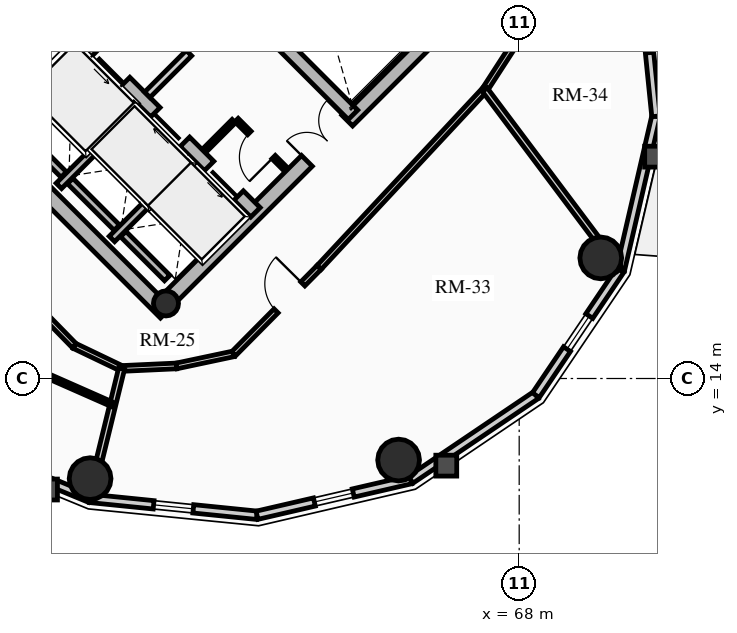
"""IFC4 building model, lengths in metres.
Left out: names, types, materials, properties, quantities, classifications, styles, units other than length and angle.
Written with IfcOpenShell. Run it as: python <this file> out.ifc"""

import sys

from ifc_helpers import new_model, si_unit, direction, frame, frame_2d, origin, origin_2d, place, context, subcontext, project, spatial, rectangle, circle, hollow_circle, extrude, source, transform, mapped, element, fill, save


model = new_model("IFC4")
c1 = context("Model", 3, precision=1e-05, world=origin(), true_north=direction((0.0, 1.0)))
c2 = subcontext(c1, "Body", "Model", "MODEL_VIEW")
j1 = project(units=[si_unit("LENGTHUNIT", "METRE"), si_unit("PLANEANGLEUNIT", "RADIAN")], contexts=[c1])
p1 = place(None, origin())
s1 = spatial("IfcSite", under=j1, at=p1, CompositionType="ELEMENT")
p2 = place(p1, origin())
s2 = spatial("IfcBuilding", under=s1, at=p2, CompositionType="ELEMENT")
p3 = place(p2, frame((0.0, 0.0, 217.03)))
s3 = spatial("IfcBuildingStorey", under=s2, at=p3, CompositionType="ELEMENT", Elevation=217.03)
p4 = place(p3, frame((58.702, 15.732, 0.0), z_axis=(0.0, 0.0, 1.0), x_axis=(-0.707106781187, 0.707106781187, 0.0)))
e1 = element("IfcWall", 1, at=p4, inside=s3, PredefinedType="SHEAR", context=c2, shape_type="SweptSolid", body=[
    extrude(rectangle(XDim=14.1, YDim=0.4, at=frame_2d((7.05, 0.0))), origin(), (0.0, 0.0, 1.0), 2.91),
])
p5 = place(p3, frame((58.561, 15.873, 0.0), z_axis=(0.0, 0.0, 1.0), x_axis=(0.707106781187, 0.707106781187, 0.0)))
e2 = element("IfcWall", 2, at=p5, inside=s3, PredefinedType="SHEAR", context=c2, shape_type="SweptSolid", body=[
    extrude(rectangle(XDim=10.7, YDim=0.4, at=frame_2d((5.35, 0.0))), origin(), (0.0, 0.0, 1.0), 2.91),
])
m1 = source(origin(), c2, "Body", "SweptSolid", [
    extrude(rectangle(XDim=1.5, YDim=2.02, at=frame_2d((0.75, 1.01))), frame((0.0, 0.21, 0.0), z_axis=(0.0, -1.0, 0.0), x_axis=(1.0, 0.0, 0.0)), (0.0, 0.0, 1.0), 0.42),
])
p6 = place(p5, frame((5.45, 0.0, 0.0)))
e3 = element("IfcOpeningElement", 3, at=p6, cuts=e2, PredefinedType="OPENING", context=c2, shape_type="MappedRepresentation", body=[
    mapped(m1, transform((0.0, 0.0, 0.0), x_axis=(1.0, 0.0, 0.0), y_axis=(0.0, 1.0, 0.0), z_axis=(0.0, 0.0, 1.0), scale=1.0)),
])
p7 = place(p3, frame((61.06, 18.373, 0.0), z_axis=(0.0, 0.0, 1.0), x_axis=(-0.707106781187, 0.707106781187, 0.0)))
e4 = element("IfcWall", 4, at=p7, inside=s3, PredefinedType="SHEAR", context=c2, shape_type="SweptSolid", body=[
    extrude(rectangle(XDim=13.7, YDim=0.35, at=frame_2d((6.85, 0.0))), origin(), (0.0, 0.0, 1.0), 2.91),
])
m2 = source(origin(), c2, "Body", "SweptSolid", [
    extrude(rectangle(XDim=1.1, YDim=2.015, at=frame_2d((0.55, 1.007))), frame((0.0, 0.185, 0.0), z_axis=(0.0, -1.0, 0.0), x_axis=(1.0, 0.0, 0.0)), (0.0, 0.0, 1.0), 0.37),
])
p8 = place(p7, frame((4.85, 0.0, 0.0)))
e5 = element("IfcOpeningElement", 5, at=p8, cuts=e4, PredefinedType="OPENING", context=c2, shape_type="MappedRepresentation", body=[
    mapped(m2, transform((0.0, 0.0, 0.0), x_axis=(1.0, 0.0, 0.0), y_axis=(0.0, 1.0, 0.0), z_axis=(0.0, 0.0, 1.0), scale=1.0)),
])
p9 = place(p7, frame((0.625, 0.0, 0.0)))
e6 = element("IfcOpeningElement", 6, at=p9, cuts=e4, PredefinedType="OPENING", context=c2, shape_type="MappedRepresentation", body=[
    mapped(m2, transform((0.0, 0.0, 0.0), x_axis=(1.0, 0.0, 0.0), y_axis=(0.0, 1.0, 0.0), z_axis=(0.0, 0.0, 1.0), scale=1.0)),
])
p10 = place(p7, frame((2.625, 0.0, 0.0)))
e7 = element("IfcOpeningElement", 7, at=p10, cuts=e4, PredefinedType="OPENING", context=c2, shape_type="MappedRepresentation", body=[
    mapped(m2, transform((0.0, 0.0, 0.0), x_axis=(1.0, 0.0, 0.0), y_axis=(0.0, 1.0, 0.0), z_axis=(0.0, 0.0, 1.0), scale=1.0)),
])
m3 = source(origin(), c2, "Body", "SweptSolid", [
    extrude(rectangle(XDim=1.15, YDim=2.02, at=frame_2d((0.575, 1.01))), frame((0.0, 0.185, 0.0), z_axis=(0.0, -1.0, 0.0), x_axis=(1.0, 0.0, 0.0)), (0.0, 0.0, 1.0), 0.37),
])
p11 = place(p7, frame((7.27, 0.0, 0.0)))
e8 = element("IfcOpeningElement", 8, at=p11, cuts=e4, PredefinedType="OPENING", context=c2, shape_type="MappedRepresentation", body=[
    mapped(m3, transform((0.0, 0.0, 0.0), x_axis=(1.0, 0.0, 0.0), y_axis=(0.0, 1.0, 0.0), z_axis=(0.0, 0.0, 1.0), scale=1.0)),
])
p12 = place(p3, frame((63.627, 20.94, 0.0), z_axis=(0.0, 0.0, 1.0), x_axis=(-0.707119496762, 0.707094065383, 0.0)))
e9 = element("IfcWall", 9, at=p12, inside=s3, PredefinedType="SHEAR", context=c2, shape_type="SweptSolid", body=[
    extrude(rectangle(XDim=9.6, YDim=0.35, at=frame_2d((4.8, 0.0))), origin(), (0.0, 0.0, 1.0), 2.91),
])
p13 = place(p12, frame((5.28, 0.0, 0.0)))
e10 = element("IfcOpeningElement", 10, at=p13, cuts=e9, PredefinedType="OPENING", context=c2, shape_type="MappedRepresentation", body=[
    mapped(m3, transform((0.0, 0.0, 0.0), x_axis=(1.0, 0.0, 0.0), y_axis=(0.0, 1.0, 0.0), z_axis=(0.0, 0.0, 1.0), scale=1.0)),
])
p14 = place(p3, frame((53.784, 21.003, 0.0), z_axis=(0.0, 0.0, 1.0), x_axis=(0.707106781187, 0.707106781187, 0.0)))
e11 = element("IfcWall", 11, at=p14, inside=s3, PredefinedType="SHEAR", context=c2, shape_type="SweptSolid", body=[
    extrude(rectangle(XDim=3.285, YDim=0.35, at=frame_2d((1.643, 0.0))), origin(), (0.0, 0.0, 1.0), 2.91),
])
p15 = place(p3, frame((58.706, 15.976, 0.0), z_axis=(0.0, 0.0, 1.0), x_axis=(0.707106781187, 0.707106781187, 0.0)))
e12 = element("IfcColumn", 12, at=p15, inside=s3, PredefinedType="COLUMN", context=c2, shape_type="SweptSolid", body=[
    extrude(hollow_circle(Radius=0.33, WallThickness=0.025, at=origin_2d()), origin(), (0.0, 0.0, 1.0), 2.91),
])
for number, where, z_axis, x_axis in (
    (13, (56.709, 11.365, 0.0), (0.0, 0.0, 1.0), (1.0, 0.0, 0.0)),
    (14, (64.827, 11.854, 0.0), (0.0, 0.0, 1.0), (1.0, 0.0, 0.0)),
    (15, (70.146, 17.173, 0.0), (0.0, 0.0, 1.0), (1.0, 0.0, 0.0)),
):
    element("IfcColumn", number, at=place(p3, frame(where, z_axis=z_axis, x_axis=x_axis)), inside=s3, PredefinedType="USERDEFINED", context=c2, shape_type="SweptSolid", body=[
        extrude(circle(Radius=0.55, at=origin_2d()), origin(), (0.0, 0.0, 1.0), 2.91),
    ])
p16 = place(p3, frame((56.705, 10.845, 0.0), z_axis=(0.0, 0.0, 1.0), x_axis=(-0.924447353237, 0.381309704956, 0.0)))
e16 = element("IfcWall", 16, at=p16, inside=s3, PredefinedType="SOLIDWALL", context=c2, shape_type="SweptSolid", body=[
    extrude(rectangle(XDim=4.671, YDim=0.22, at=frame_2d((2.335, 0.0))), origin(), (0.0, 0.0, 1.0), 2.322),
])
p17 = place(p3, frame((61.1, 10.401, 0.0), z_axis=(0.0, 0.0, 1.0), x_axis=(-0.994929930991, 0.100570534541, 0.0)))
e17 = element("IfcWall", 17, at=p17, inside=s3, PredefinedType="SOLIDWALL", context=c2, shape_type="SweptSolid", body=[
    extrude(rectangle(XDim=4.418, YDim=0.22, at=frame_2d((2.209, 0.0))), origin(), (0.0, 0.0, 1.0), 2.322),
])
m4 = source(origin(), c2, "Body", "SweptSolid", [
    extrude(rectangle(XDim=1.05, YDim=1.3, at=frame_2d((0.525, 0.65))), frame((0.0, 0.12, 0.0), z_axis=(0.0, -1.0, 0.0), x_axis=(1.0, 0.0, 0.0)), (0.0, 0.0, 1.0), 0.24),
])
p18 = place(p17, frame((1.684, 0.0, 0.65)))
e18 = element("IfcOpeningElement", 18, at=p18, cuts=e17, PredefinedType="OPENING", context=c2, shape_type="MappedRepresentation", body=[
    mapped(m4, transform((0.0, 0.0, 0.0), x_axis=(1.0, 0.0, 0.0), y_axis=(0.0, 1.0, 0.0), z_axis=(0.0, 0.0, 1.0), scale=1.0)),
])
p19 = place(p3, frame((65.144, 11.337, 0.0), z_axis=(0.0, 0.0, 1.0), x_axis=(-0.974249228678, -0.225473813158, 0.0)))
e19 = element("IfcWall", 19, at=p19, inside=s3, PredefinedType="SOLIDWALL", context=c2, shape_type="SweptSolid", body=[
    extrude(rectangle(XDim=4.15, YDim=0.22, at=frame_2d((2.075, 0.0))), origin(), (0.0, 0.0, 1.0), 2.322),
])
p20 = place(p19, frame((1.55, 0.0, 0.65)))
e20 = element("IfcOpeningElement", 20, at=p20, cuts=e19, PredefinedType="OPENING", context=c2, shape_type="MappedRepresentation", body=[
    mapped(m4, transform((0.0, 0.0, 0.0), x_axis=(1.0, 0.0, 0.0), y_axis=(0.0, 1.0, 0.0), z_axis=(0.0, 0.0, 1.0), scale=1.0)),
])
p21 = place(p3, frame((68.439, 13.561, 0.0), z_axis=(0.0, 0.0, 1.0), x_axis=(-0.828833723692, -0.559495003079, 0.0)))
e21 = element("IfcWall", 21, at=p21, inside=s3, PredefinedType="SOLIDWALL", context=c2, shape_type="SweptSolid", body=[
    extrude(rectangle(XDim=3.976, YDim=0.22, at=frame_2d((1.988, 0.0))), origin(), (0.0, 0.0, 1.0), 2.322),
])
p22 = place(p3, frame((70.663, 16.856, 0.0), z_axis=(0.0, 0.0, 1.0), x_axis=(-0.559495003079, -0.828833723692, 0.0)))
e22 = element("IfcWall", 22, at=p22, inside=s3, PredefinedType="SOLIDWALL", context=c2, shape_type="SweptSolid", body=[
    extrude(rectangle(XDim=3.976, YDim=0.22, at=frame_2d((1.988, 0.0))), origin(), (0.0, 0.0, 1.0), 2.322),
])
p23 = place(p22, frame((1.463, 0.0, 0.65)))
e23 = element("IfcOpeningElement", 23, at=p23, cuts=e22, PredefinedType="OPENING", context=c2, shape_type="MappedRepresentation", body=[
    mapped(m4, transform((0.0, 0.0, 0.0), x_axis=(1.0, 0.0, 0.0), y_axis=(0.0, 1.0, 0.0), z_axis=(0.0, 0.0, 1.0), scale=1.0)),
])
p24 = place(p3, frame((71.599, 20.9, 0.0), z_axis=(0.0, 0.0, 1.0), x_axis=(-0.225473813158, -0.974249228678, 0.0)))
e24 = element("IfcWall", 24, at=p24, inside=s3, PredefinedType="SOLIDWALL", context=c2, shape_type="SweptSolid", body=[
    extrude(rectangle(XDim=4.15, YDim=0.22, at=frame_2d((2.075, 0.0))), origin(), (0.0, 0.0, 1.0), 2.322),
])
p25 = place(p3, frame((71.155, 25.295, 0.0), z_axis=(0.0, 0.0, 1.0), x_axis=(0.100570534541, -0.994929930991, 0.0)))
e25 = element("IfcWall", 25, at=p25, inside=s3, PredefinedType="SOLIDWALL", context=c2, shape_type="SweptSolid", body=[
    extrude(rectangle(XDim=4.418, YDim=0.22, at=frame_2d((2.209, 0.0))), origin(), (0.0, 0.0, 1.0), 2.322),
])
p26 = place(p25, frame((1.684, 0.0, 0.65)))
e26 = element("IfcOpeningElement", 26, at=p26, cuts=e25, PredefinedType="OPENING", context=c2, shape_type="MappedRepresentation", body=[
    mapped(m4, transform((0.0, 0.0, 0.0), x_axis=(1.0, 0.0, 0.0), y_axis=(0.0, 1.0, 0.0), z_axis=(0.0, 0.0, 1.0), scale=1.0)),
])
p27 = place(p3, frame((55.888, 19.069, 0.0), z_axis=(0.0, 0.0, 1.0), x_axis=(0.707106781187, 0.707106781187, 0.0)))
e27 = element("IfcWall", 27, at=p27, inside=s3, PredefinedType="SHEAR", context=c2, shape_type="SweptSolid", body=[
    extrude(rectangle(XDim=2.97, YDim=0.2, at=frame_2d((1.485, 0.0))), origin(), (0.0, 0.0, 1.0), 2.91),
])
p28 = place(p3, frame((56.015, 19.366, 0.0), z_axis=(0.0, 0.0, 1.0), x_axis=(-0.707106781187, 0.707106781187, 0.0)))
e28 = element("IfcWall", 28, at=p28, inside=s3, PredefinedType="SHEAR", context=c2, shape_type="SweptSolid", body=[
    extrude(rectangle(XDim=2.44, YDim=0.2, at=frame_2d((1.22, 0.0))), origin(), (0.0, 0.0, 1.0), 2.91),
])
p29 = place(p3, frame((57.284, 17.673, 0.0), z_axis=(0.0, 0.0, 1.0), x_axis=(0.707147878904, 0.70706568108, 0.0)))
e29 = element("IfcWall", 29, at=p29, inside=s3, PredefinedType="SHEAR", context=c2, shape_type="SweptSolid", body=[
    extrude(rectangle(XDim=2.97, YDim=0.2, at=frame_2d((1.485, 0.0))), origin(), (0.0, 0.0, 1.0), 2.91),
])
p30 = place(p3, frame((57.412, 17.97, 0.0), z_axis=(0.0, 0.0, 1.0), x_axis=(-0.707106781187, 0.707106781187, 0.0)))
e30 = element("IfcWall", 30, at=p30, inside=s3, PredefinedType="SHEAR", context=c2, shape_type="SweptSolid", body=[
    extrude(rectangle(XDim=1.735, YDim=0.2, at=frame_2d((0.867, 0.0))), origin(), (0.0, 0.0, 1.0), 2.91),
])
p31 = place(p3, frame((58.737, 16.644, 0.0), z_axis=(0.0, 0.0, 1.0), x_axis=(-0.707032117043, 0.707181437447, 0.0)))
e31 = element("IfcWall", 31, at=p31, inside=s3, PredefinedType="SHEAR", context=c2, shape_type="SweptSolid", body=[
    extrude(rectangle(XDim=1.635, YDim=0.2, at=frame_2d((0.817, 0.0))), origin(), (0.0, 0.0, 1.0), 2.91),
])
p32 = place(p3, frame((58.214, 21.467, 0.0), z_axis=(0.0, 0.0, 1.0), x_axis=(0.707106781187, 0.707106781187, 0.0)))
e32 = element("IfcWall", 32, at=p32, inside=s3, PredefinedType="PARTITIONING", context=c2, shape_type="SweptSolid", body=[
    extrude(rectangle(XDim=3.28, YDim=0.2, at=frame_2d((1.64, 0.0))), origin(), (0.0, 0.0, 1.0), 2.685),
])
m5 = source(origin(), c2, "Body", "SweptSolid", [
    extrude(rectangle(XDim=1.5, YDim=2.02, at=frame_2d((0.75, 1.01))), frame((0.0, 0.11, 0.0), z_axis=(0.0, -1.0, 0.0), x_axis=(1.0, 0.0, 0.0)), (0.0, 0.0, 1.0), 0.22),
])
p33 = place(p32, frame((1.55, 0.0, 0.0)))
e33 = element("IfcOpeningElement", 33, at=p33, cuts=e32, PredefinedType="OPENING", context=c2, shape_type="MappedRepresentation", body=[
    mapped(m5, transform((0.0, 0.0, 0.0), x_axis=(1.0, 0.0, 0.0), y_axis=(0.0, 1.0, 0.0), z_axis=(0.0, 0.0, 1.0), scale=1.0)),
])
p34 = place(p3, frame((61.835, 19.529, 0.0), z_axis=(0.0, 0.0, 1.0), x_axis=(-0.707174592913, 0.707038962956, 0.0)))
e34 = element("IfcWall", 34, at=p34, inside=s3, PredefinedType="PARTITIONING", context=c2, shape_type="SweptSolid", body=[
    extrude(rectangle(XDim=1.8, YDim=0.125, at=frame_2d((0.9, 0.0))), origin(), (0.0, 0.0, 1.0), 2.685),
])
m6 = source(origin(), c2, "Body", "SweptSolid", [
    extrude(rectangle(XDim=0.9, YDim=2.005, at=frame_2d((0.45, 1.002))), frame((0.0, 0.073, 0.0), z_axis=(0.0, -1.0, 0.0), x_axis=(1.0, 0.0, 0.0)), (0.0, 0.0, 1.0), 0.145),
])
p35 = place(p34, frame((0.42, 0.0, 0.0)))
e35 = element("IfcOpeningElement", 35, at=p35, cuts=e34, PredefinedType="OPENING", context=c2, shape_type="MappedRepresentation", body=[
    mapped(m6, transform((0.0, 0.0, 0.0), x_axis=(1.0, 0.0, 0.0), y_axis=(0.0, 1.0, 0.0), z_axis=(0.0, 0.0, 1.0), scale=1.0)),
])
p36 = place(p3, frame((59.713, 19.996, 0.0), z_axis=(0.0, 0.0, 1.0), x_axis=(0.707217726, 0.706995818963, 0.0)))
e36 = element("IfcWall", 36, at=p36, inside=s3, PredefinedType="PARTITIONING", context=c2, shape_type="SweptSolid", body=[
    extrude(rectangle(XDim=1.1, YDim=0.125, at=frame_2d((0.55, 0.0))), origin(), (0.0, 0.0, 1.0), 2.685),
])
p37 = place(p3, frame((52.126, 19.126, 0.0), z_axis=(0.0, 0.0, 1.0), x_axis=(0.698979087027, -0.715142108884, 0.0)))
e37 = element("IfcWall", 37, at=p37, inside=s3, PredefinedType="PARTITIONING", context=c2, shape_type="SweptSolid", body=[
    extrude(rectangle(XDim=5.966, YDim=0.15, at=frame_2d((2.983, 0.0))), origin(), (0.0, 0.0, 1.0), 2.322),
])
m7 = source(origin(), c2, "Body", "SweptSolid", [
    extrude(rectangle(XDim=1.05, YDim=2.015, at=frame_2d((0.525, 1.007))), frame((0.0, 0.085, 0.0), z_axis=(0.0, -1.0, 0.0), x_axis=(1.0, 0.0, 0.0)), (0.0, 0.0, 1.0), 0.17),
])
p38 = place(p37, frame((2.458, 0.0, 0.0)))
e38 = element("IfcOpeningElement", 38, at=p38, cuts=e37, PredefinedType="OPENING", context=c2, shape_type="MappedRepresentation", body=[
    mapped(m7, transform((0.0, 0.0, 0.0), x_axis=(1.0, 0.0, 0.0), y_axis=(0.0, 1.0, 0.0), z_axis=(0.0, 0.0, 1.0), scale=1.0)),
])
p39 = place(p3, frame((56.296, 14.859, 0.0), z_axis=(0.0, 0.0, 1.0), x_axis=(0.90178292445, -0.432189260823, 0.0)))
e39 = element("IfcWall", 39, at=p39, inside=s3, PredefinedType="PARTITIONING", context=c2, shape_type="SweptSolid", body=[
    extrude(rectangle(XDim=1.377, YDim=0.15, at=frame_2d((0.688, 0.0))), origin(), (0.0, 0.0, 1.0), 2.255),
])
p40 = place(p3, frame((57.538, 14.264, 0.0), z_axis=(0.0, 0.0, 1.0), x_axis=(0.99892990172, 0.046249880546, 0.0)))
e40 = element("IfcWall", 40, at=p40, inside=s3, PredefinedType="PARTITIONING", context=c2, shape_type="SweptSolid", body=[
    extrude(rectangle(XDim=1.446, YDim=0.15, at=frame_2d((0.723, 0.0))), origin(), (0.0, 0.0, 1.0), 2.322),
])
p41 = place(p3, frame((58.983, 14.331, 0.0), z_axis=(0.0, 0.0, 1.0), x_axis=(0.978328007546, 0.207061125397, 0.0)))
e41 = element("IfcWall", 41, at=p41, inside=s3, PredefinedType="PARTITIONING", context=c2, shape_type="SweptSolid", body=[
    extrude(rectangle(XDim=1.534, YDim=0.15, at=frame_2d((0.767, 0.0))), origin(), (0.0, 0.0, 1.0), 2.255),
])
p42 = place(p3, frame((60.484, 14.648, 0.0), z_axis=(0.0, 0.0, 1.0), x_axis=(0.703398221944, 0.710795991383, 0.0)))
e42 = element("IfcWall", 42, at=p42, inside=s3, PredefinedType="PARTITIONING", context=c2, shape_type="SweptSolid", body=[
    extrude(rectangle(XDim=3.201, YDim=0.15, at=frame_2d((1.601, 0.0))), origin(), (0.0, 0.0, 1.0), 2.322),
])
m8 = source(origin(), c2, "Body", "SweptSolid", [
    extrude(rectangle(XDim=1.0, YDim=2.015, at=frame_2d((0.5, 1.007))), frame((0.0, 0.085, 0.0), z_axis=(0.0, -1.0, 0.0), x_axis=(1.0, 0.0, 0.0)), (0.0, 0.0, 1.0), 0.17),
])
p43 = place(p42, frame((1.591, 0.0, 0.0)))
e43 = element("IfcOpeningElement", 43, at=p43, cuts=e42, PredefinedType="OPENING", context=c2, shape_type="MappedRepresentation", body=[
    mapped(m8, transform((0.0, 0.0, 0.0), x_axis=(1.0, 0.0, 0.0), y_axis=(0.0, 1.0, 0.0), z_axis=(0.0, 0.0, 1.0), scale=1.0)),
])
p44 = place(p3, frame((62.736, 16.924, 0.0), z_axis=(0.0, 0.0, 1.0), x_axis=(0.681946700833, 0.731401871219, 0.0)))
e44 = element("IfcWall", 44, at=p44, inside=s3, PredefinedType="PARTITIONING", context=c2, shape_type="SweptSolid", body=[
    extrude(rectangle(XDim=6.393, YDim=0.15, at=frame_2d((3.196, 0.0))), origin(), (0.0, 0.0, 1.0), 2.255),
])
p45 = place(p3, frame((67.095, 21.6, 0.0), z_axis=(0.0, 0.0, 1.0), x_axis=(0.543773190184, 0.839232219137, 0.0)))
e45 = element("IfcWall", 45, at=p45, inside=s3, PredefinedType="PARTITIONING", context=c2, shape_type="SweptSolid", body=[
    extrude(rectangle(XDim=1.823, YDim=0.15, at=frame_2d((0.911, 0.0))), origin(), (0.0, 0.0, 1.0), 2.255),
])
p46 = place(p3, frame((57.538, 14.264, 0.0), z_axis=(0.0, 0.0, 1.0), x_axis=(-0.237377006249, -0.971417601706, 0.0)))
e46 = element("IfcWall", 46, at=p46, inside=s3, PredefinedType="PARTITIONING", context=c2, shape_type="SweptSolid", body=[
    extrude(rectangle(XDim=3.499, YDim=0.16, at=frame_2d((1.75, 0.0))), origin(), (0.0, 0.0, 1.0), 2.322),
])
p47 = place(p3, frame((67.095, 21.6, 0.0), z_axis=(0.0, 0.0, 1.0), x_axis=(0.599947190798, -0.800039604178, 0.0)))
e47 = element("IfcWall", 47, at=p47, inside=s3, PredefinedType="PARTITIONING", context=c2, shape_type="SweptSolid", body=[
    extrude(rectangle(XDim=5.918, YDim=0.16, at=frame_2d((2.959, 0.0))), origin(), (0.0, 0.0, 1.0), 2.322),
])
p48 = place(p3, frame((55.204, 14.239, 0.0), z_axis=(0.0, 0.0, 1.0), x_axis=(0.914999746908, -0.403454412738, 0.0)))
e48 = element("IfcWall", 48, at=p48, inside=s3, PredefinedType="PARTITIONING", context=c2, shape_type="SweptSolid", body=[
    extrude(rectangle(XDim=2.297, YDim=0.125, at=frame_2d((1.148, 0.0))), origin(), (0.0, 0.0, 1.0), 2.255),
])
m9 = source(origin(), c2, "Body", "SweptSolid", [
    extrude(rectangle(XDim=1.05, YDim=1.3, at=frame_2d((0.525, 0.65))), frame((0.0, 0.03, 0.0), z_axis=(0.0, -1.0, 0.0), x_axis=(1.0, 0.0, 0.0)), (0.0, 0.0, 1.0), 0.06),
])
p49 = place(p18, origin())
e49 = element("IfcWindow", 49, at=p49, inside=s3, PartitioningType="SINGLE_PANEL", PredefinedType="WINDOW", context=c2, shape_type="MappedRepresentation", body=[
    mapped(m9, transform((0.0, 0.0, 0.0), x_axis=(1.0, 0.0, 0.0), y_axis=(0.0, 1.0, 0.0), z_axis=(0.0, 0.0, 1.0), scale=1.0)),
])
fill(e18, e49)
p50 = place(p20, origin())
e50 = element("IfcWindow", 50, at=p50, inside=s3, PartitioningType="SINGLE_PANEL", PredefinedType="WINDOW", context=c2, shape_type="MappedRepresentation", body=[
    mapped(m9, transform((0.0, 0.0, 0.0), x_axis=(1.0, 0.0, 0.0), y_axis=(0.0, 1.0, 0.0), z_axis=(0.0, 0.0, 1.0), scale=1.0)),
])
fill(e20, e50)
p51 = place(p23, origin())
e51 = element("IfcWindow", 51, at=p51, inside=s3, PartitioningType="SINGLE_PANEL", PredefinedType="WINDOW", context=c2, shape_type="MappedRepresentation", body=[
    mapped(m9, transform((0.0, 0.0, 0.0), x_axis=(1.0, 0.0, 0.0), y_axis=(0.0, 1.0, 0.0), z_axis=(0.0, 0.0, 1.0), scale=1.0)),
])
fill(e23, e51)
p52 = place(p26, origin())
e52 = element("IfcWindow", 52, at=p52, inside=s3, PartitioningType="SINGLE_PANEL", PredefinedType="WINDOW", context=c2, shape_type="MappedRepresentation", body=[
    mapped(m9, transform((0.0, 0.0, 0.0), x_axis=(1.0, 0.0, 0.0), y_axis=(0.0, 1.0, 0.0), z_axis=(0.0, 0.0, 1.0), scale=1.0)),
])
fill(e26, e52)
m10 = source(origin(), c2, "Body", "SweptSolid", [
    extrude(rectangle(XDim=1.1, YDim=2.015, at=frame_2d((0.55, 1.007))), frame((0.0, 0.025, 0.0), z_axis=(0.0, -1.0, 0.0), x_axis=(1.0, 0.0, 0.0)), (0.0, 0.0, 1.0), 0.05),
])
p53 = place(p8, origin())
e53 = element("IfcDoor", 53, at=p53, inside=s3, OperationType="SLIDING_TO_LEFT", PredefinedType="DOOR", context=c2, shape_type="MappedRepresentation", body=[
    mapped(m10, transform((0.0, 0.0, 0.0), x_axis=(1.0, 0.0, 0.0), y_axis=(0.0, 1.0, 0.0), z_axis=(0.0, 0.0, 1.0), scale=1.0)),
])
fill(e5, e53)
p54 = place(p9, origin())
e54 = element("IfcDoor", 54, at=p54, inside=s3, OperationType="SLIDING_TO_LEFT", PredefinedType="DOOR", context=c2, shape_type="MappedRepresentation", body=[
    mapped(m10, transform((0.0, 0.0, 0.0), x_axis=(1.0, 0.0, 0.0), y_axis=(0.0, 1.0, 0.0), z_axis=(0.0, 0.0, 1.0), scale=1.0)),
])
fill(e6, e54)
p55 = place(p10, origin())
e55 = element("IfcDoor", 55, at=p55, inside=s3, OperationType="SLIDING_TO_RIGHT", PredefinedType="DOOR", context=c2, shape_type="MappedRepresentation", body=[
    mapped(m10, transform((0.0, 0.0, 0.0), x_axis=(1.0, 0.0, 0.0), y_axis=(0.0, 1.0, 0.0), z_axis=(0.0, 0.0, 1.0), scale=1.0)),
])
fill(e7, e55)
m11 = source(origin(), c2, "Body", "SweptSolid", [
    extrude(rectangle(XDim=1.5, YDim=2.02, at=frame_2d((0.75, 1.01))), frame((0.0, 0.025, 0.0), z_axis=(0.0, -1.0, 0.0), x_axis=(1.0, 0.0, 0.0)), (0.0, 0.0, 1.0), 0.05),
])
p56 = place(p6, origin())
e56 = element("IfcDoor", 56, at=p56, inside=s3, OperationType="DOUBLE_DOOR_SINGLE_SWING", PredefinedType="DOOR", context=c2, shape_type="MappedRepresentation", body=[
    mapped(m11, transform((0.0, 0.0, 0.0), x_axis=(1.0, 0.0, 0.0), y_axis=(0.0, 1.0, 0.0), z_axis=(0.0, 0.0, 1.0), scale=1.0)),
])
fill(e3, e56)
p57 = place(p33, origin())
e57 = element("IfcDoor", 57, at=p57, inside=s3, OperationType="DOUBLE_DOOR_SINGLE_SWING", PredefinedType="DOOR", context=c2, shape_type="MappedRepresentation", body=[
    mapped(m11, transform((0.0, 0.0, 0.0), x_axis=(1.0, 0.0, 0.0), y_axis=(0.0, 1.0, 0.0), z_axis=(0.0, 0.0, 1.0), scale=1.0)),
])
fill(e33, e57)
m12 = source(origin(), c2, "Body", "SweptSolid", [
    extrude(rectangle(XDim=0.9, YDim=2.005, at=frame_2d((0.45, 1.002))), frame((0.0, 0.025, 0.0), z_axis=(0.0, -1.0, 0.0), x_axis=(1.0, 0.0, 0.0)), (0.0, 0.0, 1.0), 0.05),
])
p58 = place(p35, origin())
e58 = element("IfcDoor", 58, at=p58, inside=s3, OperationType="SINGLE_SWING_LEFT", PredefinedType="DOOR", context=c2, shape_type="MappedRepresentation", body=[
    mapped(m12, transform((0.0, 0.0, 0.0), x_axis=(1.0, 0.0, 0.0), y_axis=(0.0, 1.0, 0.0), z_axis=(0.0, 0.0, 1.0), scale=1.0)),
])
fill(e35, e58)
m13 = source(origin(), c2, "Body", "SweptSolid", [
    extrude(rectangle(XDim=1.0, YDim=2.015, at=frame_2d((0.5, 1.007))), frame((0.0, 0.025, 0.0), z_axis=(0.0, -1.0, 0.0), x_axis=(1.0, 0.0, 0.0)), (0.0, 0.0, 1.0), 0.05),
])
p59 = place(p43, origin())
e59 = element("IfcDoor", 59, at=p59, inside=s3, OperationType="SINGLE_SWING_RIGHT", PredefinedType="DOOR", context=c2, shape_type="MappedRepresentation", body=[
    mapped(m13, transform((0.0, 0.0, 0.0), x_axis=(1.0, 0.0, 0.0), y_axis=(0.0, 1.0, 0.0), z_axis=(0.0, 0.0, 1.0), scale=1.0)),
])
fill(e43, e59)
save(model, sys.argv[1])
